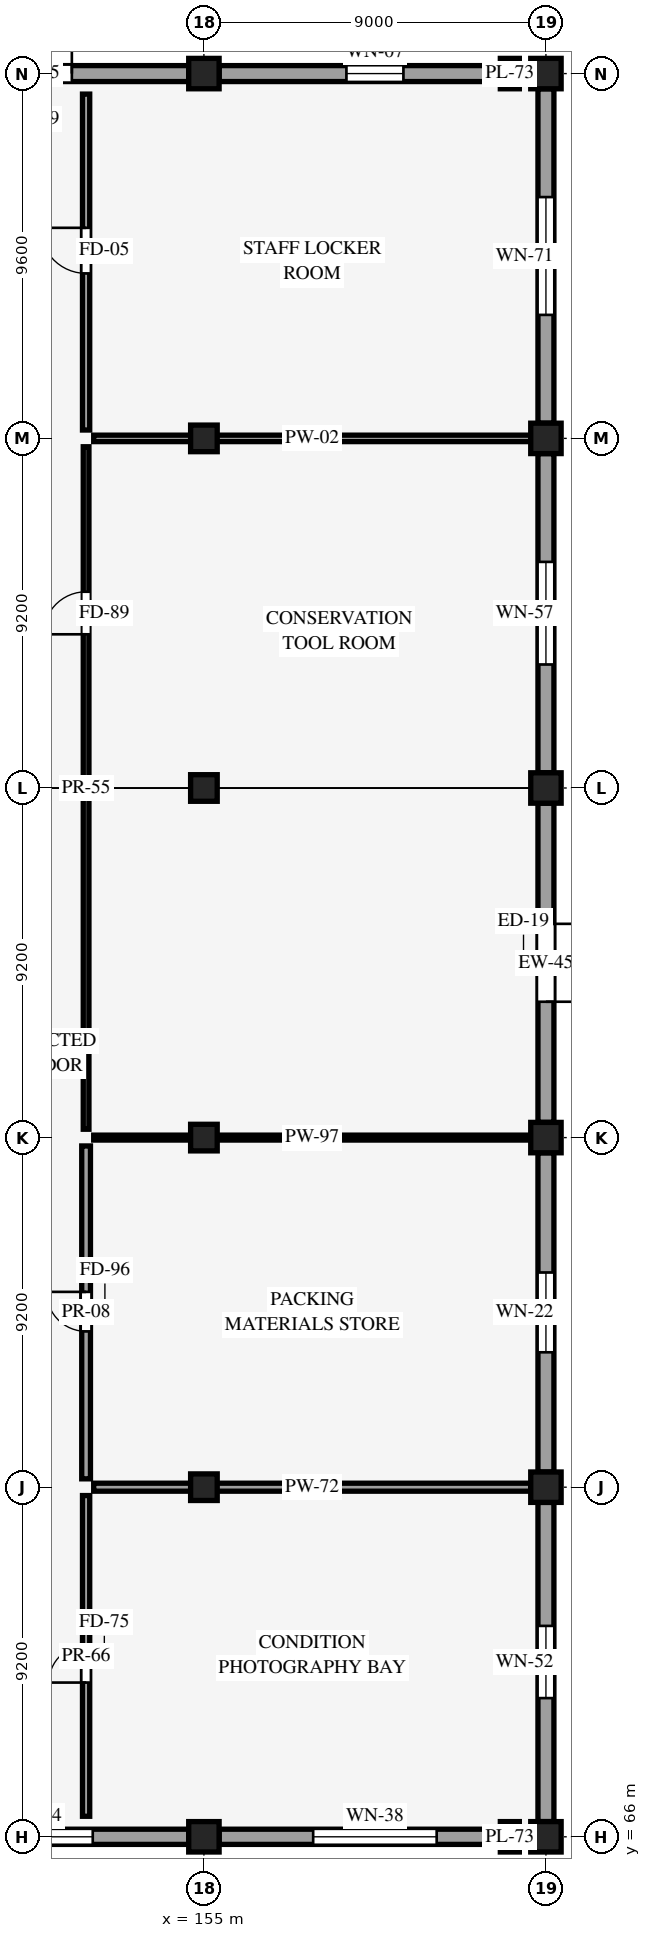
"""IFC4 building model, lengths in metres.
Left out: names, types, materials, properties, quantities, classifications, styles, units other than length and angle.
Written with IfcOpenShell. Run it as: python <this file> out.ifc"""

import sys

from ifc_helpers import new_model, si_unit, direction, frame, frame_2d, origin, origin_2d, place, context, subcontext, project, spatial, rectangle, extrude, element, fill, save


model = new_model("IFC4")
c1 = context("Model", 3, precision=1e-05, world=origin(), true_north=direction((0.0, 1.0)))
c2 = subcontext(c1, "Body", "Model", "MODEL_VIEW")
j1 = project(units=[si_unit("LENGTHUNIT", "METRE"), si_unit("PLANEANGLEUNIT", "RADIAN")], contexts=[c1])
p1 = place(None, origin())
s1 = spatial("IfcSite", under=j1, at=p1, CompositionType="ELEMENT")
p2 = place(p1, origin())
s2 = spatial("IfcBuilding", under=s1, at=p2, CompositionType="ELEMENT")
p3 = place(p2, origin())
s3 = spatial("IfcBuildingStorey", under=s2, at=p3, CompositionType="ELEMENT", Elevation=0.0)
p4 = place(p3, frame((155.0, 66.0, 0.0), z_axis=(0.0, 0.0, 1.0), x_axis=(1.0, 0.0, 0.0)))
e1 = element("IfcColumn", 1, at=p4, inside=s3, PredefinedType="COLUMN", context=c2, shape_type="SweptSolid", body=[
    extrude(rectangle(XDim=0.8, YDim=0.8, at=origin_2d()), origin(), (0.0, 0.0, 1.0), 5.4),
])
for number, where, z_axis, x_axis in (
    (2, (155.0, 75.2, 0.0), (0.0, 0.0, 1.0), (1.0, 0.0, 0.0)),
    (3, (155.0, 84.4, 0.0), (0.0, 0.0, 1.0), (1.0, 0.0, 0.0)),
    (4, (155.0, 93.6, 0.0), (0.0, 0.0, 1.0), (1.0, 0.0, 0.0)),
    (5, (155.0, 102.8, 0.0), (0.0, 0.0, 1.0), (1.0, 0.0, 0.0)),
):
    element("IfcColumn", number, at=place(p3, frame(where, z_axis=z_axis, x_axis=x_axis)), inside=s3, PredefinedType="COLUMN", context=c2, shape_type="SweptSolid", body=[
        extrude(rectangle(XDim=0.7, YDim=0.7, at=origin_2d()), origin(), (0.0, 0.0, 1.0), 5.4),
    ])
for number, where, z_axis, x_axis in (
    (6, (155.0, 112.4, 0.0), (0.0, 0.0, 1.0), (1.0, 0.0, 0.0)),
    (7, (164.0, 66.0, 0.0), (0.0, 0.0, 1.0), (1.0, 0.0, 0.0)),
    (8, (164.0, 75.2, 0.0), (0.0, 0.0, 1.0), (1.0, 0.0, 0.0)),
    (9, (164.0, 84.4, 0.0), (0.0, 0.0, 1.0), (1.0, 0.0, 0.0)),
    (10, (164.0, 93.6, 0.0), (0.0, 0.0, 1.0), (1.0, 0.0, 0.0)),
    (11, (164.0, 102.8, 0.0), (0.0, 0.0, 1.0), (1.0, 0.0, 0.0)),
    (12, (164.0, 112.4, 0.0), (0.0, 0.0, 1.0), (1.0, 0.0, 0.0)),
):
    element("IfcColumn", number, at=place(p3, frame(where, z_axis=z_axis, x_axis=x_axis)), inside=s3, PredefinedType="COLUMN", context=c2, shape_type="SweptSolid", body=[
        extrude(rectangle(XDim=0.8, YDim=0.8, at=origin_2d()), origin(), (0.0, 0.0, 1.0), 5.4),
    ])
for number, where, z_axis, x_axis in (
    (13, (163.05, 66.0, 0.0), (0.0, 0.0, 1.0), (1.0, 0.0, 0.0)),
    (14, (163.05, 112.4, 0.0), (0.0, 0.0, 1.0), (1.0, 0.0, 0.0)),
):
    element("IfcColumn", number, at=place(p3, frame(where, z_axis=z_axis, x_axis=x_axis)), inside=s3, PredefinedType="PILASTER", context=c2, shape_type="SweptSolid", body=[
        extrude(rectangle(XDim=0.5, YDim=0.8, at=origin_2d()), origin(), (0.0, 0.0, 1.0), 4.35),
    ])
p5 = place(p3, frame((146.4, 66.0, 0.0), z_axis=(0.0, 0.0, 1.0), x_axis=(1.0, 0.0, 0.0)))
e15 = element("IfcWall", 15, at=p5, inside=s3, PredefinedType="STANDARD", context=c2, shape_type="SweptSolid", body=[
    extrude(rectangle(XDim=8.2, YDim=0.4, at=frame_2d((4.1, 0.0))), origin(), (0.0, 0.0, 1.0), 4.095),
])
p6 = place(p5, frame((5.675, 0.0, 0.85), z_axis=(0.0, 0.0, 1.0), x_axis=(-1.0, 0.0, 0.0)))
e16 = element("IfcOpeningElement", 16, at=p6, cuts=e15, PredefinedType="OPENING", context=c2, shape_type="SweptSolid", body=[
    extrude(rectangle(XDim=3.15, YDim=2.55, at=frame_2d((1.575, 1.275))), frame((0.0, 0.21, 0.0), z_axis=(0.0, -1.0, 0.0), x_axis=(1.0, 0.0, 0.0)), (0.0, 0.0, 1.0), 0.42),
])
p7 = place(p3, frame((146.4, 112.4, 0.0), z_axis=(0.0, 0.0, 1.0), x_axis=(1.0, 0.0, 0.0)))
e17 = element("IfcWall", 17, at=p7, inside=s3, PredefinedType="STANDARD", context=c2, shape_type="SweptSolid", body=[
    extrude(rectangle(XDim=8.2, YDim=0.42, at=frame_2d((4.1, 0.0))), origin(), (0.0, 0.0, 1.0), 4.095),
])
p8 = place(p7, frame((3.075, 0.0, 0.0)))
e18 = element("IfcOpeningElement", 18, at=p8, cuts=e17, PredefinedType="OPENING", context=c2, shape_type="SweptSolid", body=[
    extrude(rectangle(XDim=2.05, YDim=2.45, at=frame_2d((1.025, 1.225))), frame((0.0, 0.22, 0.0), z_axis=(0.0, -1.0, 0.0), x_axis=(1.0, 0.0, 0.0)), (0.0, 0.0, 1.0), 0.44),
])
p9 = place(p3, frame((155.4, 66.0, 0.0), z_axis=(0.0, 0.0, 1.0), x_axis=(1.0, 0.0, 0.0)))
e19 = element("IfcWall", 19, at=p9, inside=s3, PredefinedType="STANDARD", context=c2, shape_type="SweptSolid", body=[
    extrude(rectangle(XDim=8.2, YDim=0.4, at=frame_2d((4.1, 0.0))), origin(), (0.0, 0.0, 1.0), 4.095),
])
p10 = place(p9, frame((5.725, 0.0, 0.85), z_axis=(0.0, 0.0, 1.0), x_axis=(-1.0, 0.0, 0.0)))
e20 = element("IfcOpeningElement", 20, at=p10, cuts=e19, PredefinedType="OPENING", context=c2, shape_type="SweptSolid", body=[
    extrude(rectangle(XDim=3.25, YDim=2.6, at=frame_2d((1.625, 1.3))), frame((0.0, 0.21, 0.0), z_axis=(0.0, -1.0, 0.0), x_axis=(1.0, 0.0, 0.0)), (0.0, 0.0, 1.0), 0.42),
])
p11 = place(p3, frame((155.4, 112.4, 0.0), z_axis=(0.0, 0.0, 1.0), x_axis=(1.0, 0.0, 0.0)))
e21 = element("IfcWall", 21, at=p11, inside=s3, PredefinedType="STANDARD", context=c2, shape_type="SweptSolid", body=[
    extrude(rectangle(XDim=8.2, YDim=0.42, at=frame_2d((4.1, 0.0))), origin(), (0.0, 0.0, 1.0), 4.095),
])
p12 = place(p11, frame((3.35, 0.0, 0.85)))
e22 = element("IfcOpeningElement", 22, at=p12, cuts=e21, PredefinedType="OPENING", context=c2, shape_type="SweptSolid", body=[
    extrude(rectangle(XDim=1.5, YDim=2.2, at=frame_2d((0.75, 1.1))), frame((0.0, 0.22, 0.0), z_axis=(0.0, -1.0, 0.0), x_axis=(1.0, 0.0, 0.0)), (0.0, 0.0, 1.0), 0.44),
])
p13 = place(p3, frame((164.0, 66.4, 0.0), z_axis=(0.0, 0.0, 1.0), x_axis=(0.0, 1.0, 0.0)))
e23 = element("IfcWall", 23, at=p13, inside=s3, PredefinedType="STANDARD", context=c2, shape_type="SweptSolid", body=[
    extrude(rectangle(XDim=8.4, YDim=0.42, at=frame_2d((4.2, 0.0))), origin(), (0.0, 0.0, 1.0), 4.095),
])
p14 = place(p13, frame((5.15, 0.0, 0.85), z_axis=(0.0, 0.0, 1.0), x_axis=(-1.0, 0.0, 0.0)))
e24 = element("IfcOpeningElement", 24, at=p14, cuts=e23, PredefinedType="OPENING", context=c2, shape_type="SweptSolid", body=[
    extrude(rectangle(XDim=1.9, YDim=2.4, at=frame_2d((0.95, 1.2))), frame((0.0, 0.22, 0.0), z_axis=(0.0, -1.0, 0.0), x_axis=(1.0, 0.0, 0.0)), (0.0, 0.0, 1.0), 0.44),
])
p15 = place(p3, frame((164.0, 75.6, 0.0), z_axis=(0.0, 0.0, 1.0), x_axis=(0.0, 1.0, 0.0)))
e25 = element("IfcWall", 25, at=p15, inside=s3, PredefinedType="STANDARD", context=c2, shape_type="SweptSolid", body=[
    extrude(rectangle(XDim=8.4, YDim=0.42, at=frame_2d((4.2, 0.0))), origin(), (0.0, 0.0, 1.0), 4.095),
])
p16 = place(p15, frame((5.25, 0.0, 0.85), z_axis=(0.0, 0.0, 1.0), x_axis=(-1.0, 0.0, 0.0)))
e26 = element("IfcOpeningElement", 26, at=p16, cuts=e25, PredefinedType="OPENING", context=c2, shape_type="SweptSolid", body=[
    extrude(rectangle(XDim=2.1, YDim=2.45, at=frame_2d((1.05, 1.225))), frame((0.0, 0.22, 0.0), z_axis=(0.0, -1.0, 0.0), x_axis=(1.0, 0.0, 0.0)), (0.0, 0.0, 1.0), 0.44),
])
p17 = place(p3, frame((164.0, 84.8, 0.0), z_axis=(0.0, 0.0, 1.0), x_axis=(0.0, 1.0, 0.0)))
e27 = element("IfcWall", 27, at=p17, inside=s3, PredefinedType="STANDARD", context=c2, shape_type="SweptSolid", body=[
    extrude(rectangle(XDim=8.4, YDim=0.42, at=frame_2d((4.2, 0.0))), origin(), (0.0, 0.0, 1.0), 4.095),
])
p18 = place(p17, frame((5.225, 0.0, 0.0), z_axis=(0.0, 0.0, 1.0), x_axis=(-1.0, 0.0, 0.0)))
e28 = element("IfcOpeningElement", 28, at=p18, cuts=e27, PredefinedType="OPENING", context=c2, shape_type="SweptSolid", body=[
    extrude(rectangle(XDim=2.05, YDim=2.45, at=frame_2d((1.025, 1.225))), frame((0.0, 0.22, 0.0), z_axis=(0.0, -1.0, 0.0), x_axis=(1.0, 0.0, 0.0)), (0.0, 0.0, 1.0), 0.44),
])
p19 = place(p3, frame((164.0, 94.0, 0.0), z_axis=(0.0, 0.0, 1.0), x_axis=(0.0, 1.0, 0.0)))
e29 = element("IfcWall", 29, at=p19, inside=s3, PredefinedType="STANDARD", context=c2, shape_type="SweptSolid", body=[
    extrude(rectangle(XDim=8.4, YDim=0.42, at=frame_2d((4.2, 0.0))), origin(), (0.0, 0.0, 1.0), 4.095),
])
p20 = place(p19, frame((5.55, 0.0, 0.85), z_axis=(0.0, 0.0, 1.0), x_axis=(-1.0, 0.0, 0.0)))
e30 = element("IfcOpeningElement", 30, at=p20, cuts=e29, PredefinedType="OPENING", context=c2, shape_type="SweptSolid", body=[
    extrude(rectangle(XDim=2.7, YDim=2.2, at=frame_2d((1.35, 1.1))), frame((0.0, 0.22, 0.0), z_axis=(0.0, -1.0, 0.0), x_axis=(1.0, 0.0, 0.0)), (0.0, 0.0, 1.0), 0.44),
])
p21 = place(p3, frame((164.0, 103.2, 0.0), z_axis=(0.0, 0.0, 1.0), x_axis=(0.0, 1.0, 0.0)))
e31 = element("IfcWall", 31, at=p21, inside=s3, PredefinedType="STANDARD", context=c2, shape_type="SweptSolid", body=[
    extrude(rectangle(XDim=8.8, YDim=0.42, at=frame_2d((4.4, 0.0))), origin(), (0.0, 0.0, 1.0), 4.095),
])
p22 = place(p21, frame((5.95, 0.0, 0.85), z_axis=(0.0, 0.0, 1.0), x_axis=(-1.0, 0.0, 0.0)))
e32 = element("IfcOpeningElement", 32, at=p22, cuts=e31, PredefinedType="OPENING", context=c2, shape_type="SweptSolid", body=[
    extrude(rectangle(XDim=3.1, YDim=2.3, at=frame_2d((1.55, 1.15))), frame((0.0, 0.22, 0.0), z_axis=(0.0, -1.0, 0.0), x_axis=(1.0, 0.0, 0.0)), (0.0, 0.0, 1.0), 0.44),
])
p23 = place(p3, frame((151.9, 66.54, 0.0), z_axis=(0.0, 0.0, 1.0), x_axis=(0.0, 1.0, 0.0)))
e33 = element("IfcWall", 33, at=p23, inside=s3, PredefinedType="PARTITIONING", context=c2, shape_type="SweptSolid", body=[
    extrude(rectangle(XDim=8.44, YDim=0.19, at=frame_2d((4.22, 0.0))), origin(), (0.0, 0.0, 1.0), 4.095),
])
p24 = place(p23, frame((3.519, 0.0, 0.0)))
e34 = element("IfcOpeningElement", 34, at=p24, cuts=e33, PredefinedType="OPENING", context=c2, shape_type="SweptSolid", body=[
    extrude(rectangle(XDim=0.98, YDim=2.18, at=frame_2d((0.49, 1.09))), frame((0.0, 0.105, 0.0), z_axis=(0.0, -1.0, 0.0), x_axis=(1.0, 0.0, 0.0)), (0.0, 0.0, 1.0), 0.21),
])
p25 = place(p3, frame((152.1, 75.2, 0.0), z_axis=(0.0, 0.0, 1.0), x_axis=(1.0, 0.0, 0.0)))
e35 = element("IfcWall", 35, at=p25, inside=s3, PredefinedType="PARTITIONING", context=c2, shape_type="SweptSolid", body=[
    extrude(rectangle(XDim=11.5, YDim=0.21, at=frame_2d((5.75, 0.0))), origin(), (0.0, 0.0, 1.0), 4.095),
])
p26 = place(p3, frame((151.9, 75.42, 0.0), z_axis=(0.0, 0.0, 1.0), x_axis=(0.0, 1.0, 0.0)))
e36 = element("IfcWall", 36, at=p26, inside=s3, PredefinedType="PARTITIONING", context=c2, shape_type="SweptSolid", body=[
    extrude(rectangle(XDim=8.76, YDim=0.23, at=frame_2d((4.38, 0.0))), origin(), (0.0, 0.0, 1.0), 4.095),
])
p27 = place(p26, frame((3.88, 0.0, 0.0)))
e37 = element("IfcOpeningElement", 37, at=p27, cuts=e36, PredefinedType="OPENING", context=c2, shape_type="SweptSolid", body=[
    extrude(rectangle(XDim=1.04, YDim=2.22, at=frame_2d((0.52, 1.11))), frame((0.0, 0.125, 0.0), z_axis=(0.0, -1.0, 0.0), x_axis=(1.0, 0.0, 0.0)), (0.0, 0.0, 1.0), 0.25),
])
p28 = place(p3, frame((152.1, 84.4, 0.0), z_axis=(0.0, 0.0, 1.0), x_axis=(1.0, 0.0, 0.0)))
e38 = element("IfcWall", 38, at=p28, inside=s3, PredefinedType="PARTITIONING", context=c2, shape_type="SweptSolid", body=[
    extrude(rectangle(XDim=11.5, YDim=0.13, at=frame_2d((5.75, 0.0))), origin(), (0.0, 0.0, 1.0), 4.095),
])
p29 = place(p3, frame((151.9, 84.62, 0.0), z_axis=(0.0, 0.0, 1.0), x_axis=(0.0, 1.0, 0.0)))
e39 = element("IfcWall", 39, at=p29, inside=s3, PredefinedType="PARTITIONING", context=c2, shape_type="SweptSolid", body=[
    extrude(rectangle(XDim=17.96, YDim=0.15, at=frame_2d((8.98, 0.0))), origin(), (0.0, 0.0, 1.0), 4.095),
])
p30 = place(p29, frame((13.024, 0.0, 0.0)))
e40 = element("IfcOpeningElement", 40, at=p30, cuts=e39, PredefinedType="OPENING", context=c2, shape_type="SweptSolid", body=[
    extrude(rectangle(XDim=1.12, YDim=2.26, at=frame_2d((0.56, 1.13))), frame((0.0, 0.085, 0.0), z_axis=(0.0, -1.0, 0.0), x_axis=(1.0, 0.0, 0.0)), (0.0, 0.0, 1.0), 0.17),
])
p31 = place(p3, frame((152.1, 102.8, 0.0), z_axis=(0.0, 0.0, 1.0), x_axis=(1.0, 0.0, 0.0)))
e41 = element("IfcWall", 41, at=p31, inside=s3, PredefinedType="PARTITIONING", context=c2, shape_type="SweptSolid", body=[
    extrude(rectangle(XDim=11.5, YDim=0.17, at=frame_2d((5.75, 0.0))), origin(), (0.0, 0.0, 1.0), 4.095),
])
p32 = place(p3, frame((151.9, 103.02, 0.0), z_axis=(0.0, 0.0, 1.0), x_axis=(0.0, 1.0, 0.0)))
e42 = element("IfcWall", 42, at=p32, inside=s3, PredefinedType="PARTITIONING", context=c2, shape_type="SweptSolid", body=[
    extrude(rectangle(XDim=8.84, YDim=0.19, at=frame_2d((4.42, 0.0))), origin(), (0.0, 0.0, 1.0), 4.095),
])
p33 = place(p32, frame((4.121, 0.0, 0.0)))
e43 = element("IfcOpeningElement", 43, at=p33, cuts=e42, PredefinedType="OPENING", context=c2, shape_type="SweptSolid", body=[
    extrude(rectangle(XDim=1.2, YDim=2.3, at=frame_2d((0.6, 1.15))), frame((0.0, 0.105, 0.0), z_axis=(0.0, -1.0, 0.0), x_axis=(1.0, 0.0, 0.0)), (0.0, 0.0, 1.0), 0.21),
])
p34 = place(p6, origin())
e44 = element("IfcWindow", 44, at=p34, inside=s3, PartitioningType="SINGLE_PANEL", PredefinedType="WINDOW", context=c2, shape_type="SweptSolid", body=[
    extrude(rectangle(XDim=3.15, YDim=2.55, at=frame_2d((1.575, 1.275))), frame((0.0, 0.03, 0.0), z_axis=(0.0, -1.0, 0.0), x_axis=(1.0, 0.0, 0.0)), (0.0, 0.0, 1.0), 0.06),
])
fill(e16, e44)
p35 = place(p8, origin())
e45 = element("IfcDoor", 45, at=p35, inside=s3, OperationType="DOUBLE_DOOR_SINGLE_SWING", PredefinedType="DOOR", context=c2, shape_type="SweptSolid", body=[
    extrude(rectangle(XDim=2.05, YDim=2.45, at=frame_2d((1.025, 1.225))), frame((0.0, 0.025, 0.0), z_axis=(0.0, -1.0, 0.0), x_axis=(1.0, 0.0, 0.0)), (0.0, 0.0, 1.0), 0.05),
])
fill(e18, e45)
p36 = place(p10, origin())
e46 = element("IfcWindow", 46, at=p36, inside=s3, PartitioningType="SINGLE_PANEL", PredefinedType="WINDOW", context=c2, shape_type="SweptSolid", body=[
    extrude(rectangle(XDim=3.25, YDim=2.6, at=frame_2d((1.625, 1.3))), frame((0.0, 0.03, 0.0), z_axis=(0.0, -1.0, 0.0), x_axis=(1.0, 0.0, 0.0)), (0.0, 0.0, 1.0), 0.06),
])
fill(e20, e46)
p37 = place(p12, origin())
e47 = element("IfcWindow", 47, at=p37, inside=s3, PartitioningType="SINGLE_PANEL", PredefinedType="WINDOW", context=c2, shape_type="SweptSolid", body=[
    extrude(rectangle(XDim=1.5, YDim=2.2, at=frame_2d((0.75, 1.1))), frame((0.0, 0.03, 0.0), z_axis=(0.0, -1.0, 0.0), x_axis=(1.0, 0.0, 0.0)), (0.0, 0.0, 1.0), 0.06),
])
fill(e22, e47)
p38 = place(p14, origin())
e48 = element("IfcWindow", 48, at=p38, inside=s3, PartitioningType="SINGLE_PANEL", PredefinedType="WINDOW", context=c2, shape_type="SweptSolid", body=[
    extrude(rectangle(XDim=1.9, YDim=2.4, at=frame_2d((0.95, 1.2))), frame((0.0, 0.03, 0.0), z_axis=(0.0, -1.0, 0.0), x_axis=(1.0, 0.0, 0.0)), (0.0, 0.0, 1.0), 0.06),
])
fill(e24, e48)
p39 = place(p16, origin())
e49 = element("IfcWindow", 49, at=p39, inside=s3, PartitioningType="SINGLE_PANEL", PredefinedType="WINDOW", context=c2, shape_type="SweptSolid", body=[
    extrude(rectangle(XDim=2.1, YDim=2.45, at=frame_2d((1.05, 1.225))), frame((0.0, 0.03, 0.0), z_axis=(0.0, -1.0, 0.0), x_axis=(1.0, 0.0, 0.0)), (0.0, 0.0, 1.0), 0.06),
])
fill(e26, e49)
p40 = place(p18, origin())
e50 = element("IfcDoor", 50, at=p40, inside=s3, OperationType="DOUBLE_DOOR_SINGLE_SWING", PredefinedType="DOOR", context=c2, shape_type="SweptSolid", body=[
    extrude(rectangle(XDim=2.05, YDim=2.45, at=frame_2d((1.025, 1.225))), frame((0.0, 0.025, 0.0), z_axis=(0.0, -1.0, 0.0), x_axis=(1.0, 0.0, 0.0)), (0.0, 0.0, 1.0), 0.05),
])
fill(e28, e50)
p41 = place(p20, origin())
e51 = element("IfcWindow", 51, at=p41, inside=s3, PartitioningType="SINGLE_PANEL", PredefinedType="WINDOW", context=c2, shape_type="SweptSolid", body=[
    extrude(rectangle(XDim=2.7, YDim=2.2, at=frame_2d((1.35, 1.1))), frame((0.0, 0.03, 0.0), z_axis=(0.0, -1.0, 0.0), x_axis=(1.0, 0.0, 0.0)), (0.0, 0.0, 1.0), 0.06),
])
fill(e30, e51)
p42 = place(p22, origin())
e52 = element("IfcWindow", 52, at=p42, inside=s3, PartitioningType="SINGLE_PANEL", PredefinedType="WINDOW", context=c2, shape_type="SweptSolid", body=[
    extrude(rectangle(XDim=3.1, YDim=2.3, at=frame_2d((1.55, 1.15))), frame((0.0, 0.03, 0.0), z_axis=(0.0, -1.0, 0.0), x_axis=(1.0, 0.0, 0.0)), (0.0, 0.0, 1.0), 0.06),
])
fill(e32, e52)
p43 = place(p24, origin())
e53 = element("IfcDoor", 53, at=p43, inside=s3, OperationType="SINGLE_SWING_LEFT", PredefinedType="DOOR", context=c2, shape_type="SweptSolid", body=[
    extrude(rectangle(XDim=0.98, YDim=2.18, at=frame_2d((0.49, 1.09))), frame((0.0, 0.025, 0.0), z_axis=(0.0, -1.0, 0.0), x_axis=(1.0, 0.0, 0.0)), (0.0, 0.0, 1.0), 0.05),
])
fill(e34, e53)
p44 = place(p27, origin())
e54 = element("IfcDoor", 54, at=p44, inside=s3, OperationType="SINGLE_SWING_RIGHT", PredefinedType="DOOR", context=c2, shape_type="SweptSolid", body=[
    extrude(rectangle(XDim=1.04, YDim=2.22, at=frame_2d((0.52, 1.11))), frame((0.0, 0.025, 0.0), z_axis=(0.0, -1.0, 0.0), x_axis=(1.0, 0.0, 0.0)), (0.0, 0.0, 1.0), 0.05),
])
fill(e37, e54)
p45 = place(p30, origin())
e55 = element("IfcDoor", 55, at=p45, inside=s3, OperationType="SINGLE_SWING_LEFT", PredefinedType="DOOR", context=c2, shape_type="SweptSolid", body=[
    extrude(rectangle(XDim=1.12, YDim=2.26, at=frame_2d((0.56, 1.13))), frame((0.0, 0.025, 0.0), z_axis=(0.0, -1.0, 0.0), x_axis=(1.0, 0.0, 0.0)), (0.0, 0.0, 1.0), 0.05),
])
fill(e40, e55)
p46 = place(p33, origin())
e56 = element("IfcDoor", 56, at=p46, inside=s3, OperationType="SINGLE_SWING_RIGHT", PredefinedType="DOOR", context=c2, shape_type="SweptSolid", body=[
    extrude(rectangle(XDim=1.2, YDim=2.3, at=frame_2d((0.6, 1.15))), frame((0.0, 0.025, 0.0), z_axis=(0.0, -1.0, 0.0), x_axis=(1.0, 0.0, 0.0)), (0.0, 0.0, 1.0), 0.05),
])
fill(e43, e56)
save(model, sys.argv[1])
